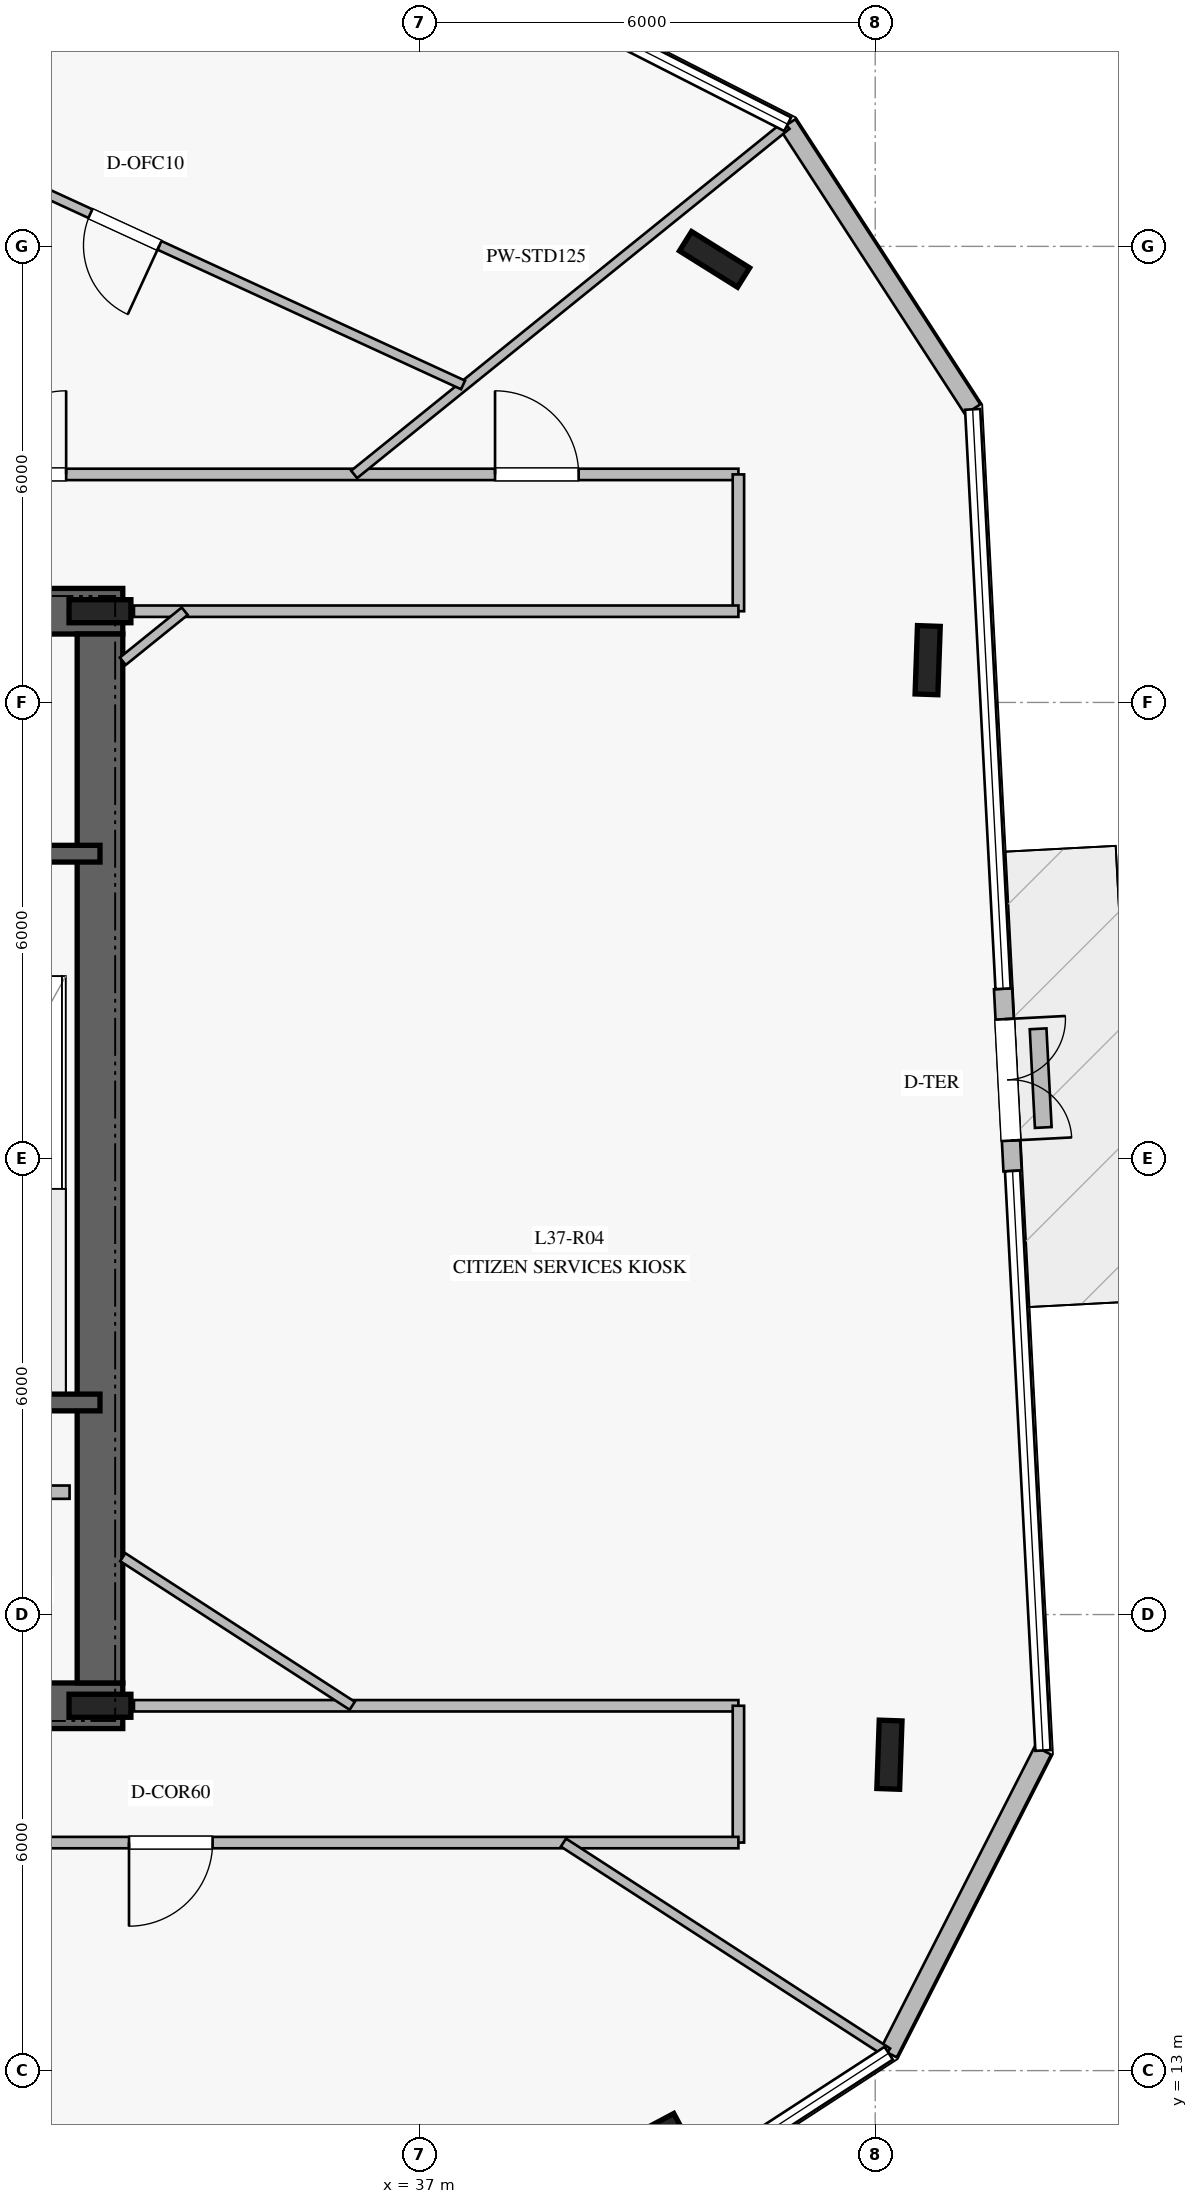
"""IFC4 building model, lengths in metres.
Left out: names, types, materials, properties, quantities, classifications, styles, units other than length and angle.
Written with IfcOpenShell. Run it as: python <this file> out.ifc"""

import sys

from ifc_helpers import new_model, si_unit, direction, frame, frame_2d, origin, origin_2d, place, context, subcontext, project, spatial, rectangle, i_section, extrude, element, fill, save


model = new_model("IFC4")
c1 = context("Model", 3, precision=1e-05, world=origin(), true_north=direction((0.0, 1.0)))
c2 = subcontext(c1, "Body", "Model", "MODEL_VIEW")
j1 = project(units=[si_unit("LENGTHUNIT", "METRE"), si_unit("PLANEANGLEUNIT", "RADIAN")], contexts=[c1])
p1 = place(None, origin())
s1 = spatial("IfcSite", under=j1, at=p1, CompositionType="ELEMENT")
p2 = place(p1, origin())
s2 = spatial("IfcBuilding", under=s1, at=p2, CompositionType="ELEMENT")
p3 = place(p2, frame((0.0, 0.0, 154.4)))
s3 = spatial("IfcBuildingStorey", under=s2, at=p3, CompositionType="ELEMENT", Elevation=154.4)
p4 = place(p3, frame((16.9, 17.8, 0.0), z_axis=(0.0, 0.0, 1.0), x_axis=(1.0, 0.0, 0.0)))
e1 = element("IfcWall", 1, at=p4, inside=s3, PredefinedType="SHEAR", context=c2, shape_type="SweptSolid", body=[
    extrude(rectangle(XDim=16.2, YDim=0.6, at=frame_2d((8.1, 0.0))), origin(), (0.0, 0.0, 1.0), 3.76),
])
p5 = place(p4, frame((5.05, 0.0, 0.0)))
e2 = element("IfcOpeningElement", 2, at=p5, cuts=e1, PredefinedType="OPENING", context=c2, shape_type="SweptSolid", body=[
    extrude(rectangle(XDim=1.2, YDim=2.25, at=frame_2d((0.6, 1.125))), frame((0.0, 0.31, 0.0), z_axis=(0.0, -1.0, 0.0), x_axis=(1.0, 0.0, 0.0)), (0.0, 0.0, 1.0), 0.62),
])
p6 = place(p4, frame((10.95, 0.0, 0.0)))
e3 = element("IfcOpeningElement", 3, at=p6, cuts=e1, PredefinedType="OPENING", context=c2, shape_type="SweptSolid", body=[
    extrude(rectangle(XDim=1.1, YDim=2.2, at=frame_2d((0.55, 1.1))), frame((0.0, 0.31, 0.0), z_axis=(0.0, -1.0, 0.0), x_axis=(1.0, 0.0, 0.0)), (0.0, 0.0, 1.0), 0.62),
])
p7 = place(p3, frame((33.1, 32.2, 0.0), z_axis=(0.0, 0.0, 1.0), x_axis=(-1.0, 0.0, 0.0)))
e4 = element("IfcWall", 4, at=p7, inside=s3, PredefinedType="SHEAR", context=c2, shape_type="SweptSolid", body=[
    extrude(rectangle(XDim=16.2, YDim=0.6, at=frame_2d((8.1, 0.0))), origin(), (0.0, 0.0, 1.0), 3.76),
])
p8 = place(p7, frame((5.05, 0.0, 0.0)))
e5 = element("IfcOpeningElement", 5, at=p8, cuts=e4, PredefinedType="OPENING", context=c2, shape_type="SweptSolid", body=[
    extrude(rectangle(XDim=1.2, YDim=2.25, at=frame_2d((0.6, 1.125))), frame((0.0, 0.31, 0.0), z_axis=(0.0, -1.0, 0.0), x_axis=(1.0, 0.0, 0.0)), (0.0, 0.0, 1.0), 0.62),
])
p9 = place(p7, frame((11.85, 0.0, 0.0)))
e6 = element("IfcOpeningElement", 6, at=p9, cuts=e4, PredefinedType="OPENING", context=c2, shape_type="SweptSolid", body=[
    extrude(rectangle(XDim=1.1, YDim=2.2, at=frame_2d((0.55, 1.1))), frame((0.0, 0.31, 0.0), z_axis=(0.0, -1.0, 0.0), x_axis=(1.0, 0.0, 0.0)), (0.0, 0.0, 1.0), 0.62),
])
p10 = place(p7, frame((9.875, 0.0, 0.0)))
e7 = element("IfcOpeningElement", 7, at=p10, cuts=e4, PredefinedType="OPENING", context=c2, shape_type="SweptSolid", body=[
    extrude(rectangle(XDim=1.1, YDim=2.2, at=frame_2d((0.55, 1.1))), frame((0.0, 0.31, 0.0), z_axis=(0.0, -1.0, 0.0), x_axis=(1.0, 0.0, 0.0)), (0.0, 0.0, 1.0), 0.62),
])
p11 = place(p7, frame((7.9, 0.0, 0.0)))
e8 = element("IfcOpeningElement", 8, at=p11, cuts=e4, PredefinedType="OPENING", context=c2, shape_type="SweptSolid", body=[
    extrude(rectangle(XDim=1.1, YDim=2.2, at=frame_2d((0.55, 1.1))), frame((0.0, 0.31, 0.0), z_axis=(0.0, -1.0, 0.0), x_axis=(1.0, 0.0, 0.0)), (0.0, 0.0, 1.0), 0.62),
])
p12 = place(p3, frame((32.8, 18.1, 0.0), z_axis=(0.0, 0.0, 1.0), x_axis=(0.0, 1.0, 0.0)))
e9 = element("IfcWall", 9, at=p12, inside=s3, PredefinedType="SHEAR", context=c2, shape_type="SweptSolid", body=[
    extrude(rectangle(XDim=13.8, YDim=0.6, at=frame_2d((6.9, 0.0))), origin(), (0.0, 0.0, 1.0), 3.76),
])
for number, where, z_axis, x_axis in (
    (10, (32.8, 17.8, 0.0), (0.0, 0.0, 1.0), (1.0, 0.0, 0.0)),
    (11, (32.8, 32.2, 0.0), (0.0, 0.0, 1.0), (1.0, 0.0, 0.0)),
):
    element("IfcColumn", number, at=place(p3, frame(where, z_axis=z_axis, x_axis=x_axis)), inside=s3, PredefinedType="COLUMN", context=c2, shape_type="SweptSolid", body=[
        extrude(i_section(OverallWidth=0.303, OverallDepth=0.814, WebThickness=0.021, FlangeThickness=0.04, at=origin_2d()), origin(), (0.0, 0.0, 1.0), 4.0),
    ])
for number, where, z_axis, x_axis in (
    (12, (29.08, 21.79, 0.0), (0.0, 0.0, 1.0), (1.0, 0.0, 0.0)),
    (13, (29.08, 29.01, 0.0), (0.0, 0.0, 1.0), (1.0, 0.0, 0.0)),
):
    element("IfcWall", number, at=place(p3, frame(where, z_axis=z_axis, x_axis=x_axis)), inside=s3, PredefinedType="SOLIDWALL", context=c2, shape_type="SweptSolid", body=[
        extrude(rectangle(XDim=3.72, YDim=0.22, at=frame_2d((1.86, 0.0))), origin(), (0.0, 0.0, 1.0), 3.76),
    ])
for number, where, z_axis, x_axis in (
    (14, (40.886, 36.829, 0.0), (0.0, 0.0, 1.0), (-0.848, 0.53, 0.0)),
    (15, (40.023, 12.092, 0.0), (0.0, 0.0, 1.0), (0.883, 0.469, 0.0)),
    (16, (43.187, 17.156, 0.0), (0.0, 0.0, 1.0), (0.035, 0.999, 0.0)),
    (17, (43.69, 31.556, 0.0), (0.0, 0.0, 1.0), (0.035, 0.999, 0.0)),
):
    element("IfcColumn", number, at=place(p3, frame(where, z_axis=z_axis, x_axis=x_axis)), inside=s3, PredefinedType="COLUMN", context=c2, shape_type="SweptSolid", body=[
        extrude(i_section(OverallWidth=0.3, OverallDepth=0.9, WebThickness=0.019, FlangeThickness=0.035, at=origin_2d()), origin(), (0.0, 0.0, 1.0), 4.0),
    ])
p13 = place(p3, frame((43.177, 13.229, 0.0), z_axis=(0.0, 0.0, 1.0), x_axis=(0.454103301767, 0.89094903969, 0.0)))
e18 = element("IfcWall", 18, at=p13, inside=s3, PredefinedType="STANDARD", context=c2, shape_type="SweptSolid", body=[
    extrude(rectangle(XDim=4.47, YDim=0.24, at=frame_2d((2.235, 0.0))), origin(), (0.0, 0.0, 1.0), 3.76),
])
p14 = place(p3, frame((44.807, 24.836, 0.0), z_axis=(0.0, 0.0, 1.0), x_axis=(-0.052078347636, 0.998643002132, 0.0)))
e19 = element("IfcWall", 19, at=p14, inside=s3, PredefinedType="STANDARD", context=c2, shape_type="SweptSolid", body=[
    extrude(rectangle(XDim=2.4, YDim=0.24, at=frame_2d((1.2, 0.0))), origin(), (0.0, 0.0, 1.0), 3.76),
])
p15 = place(p14, frame((0.4, 0.0, 0.0)))
e20 = element("IfcOpeningElement", 20, at=p15, cuts=e19, PredefinedType="OPENING", context=c2, shape_type="SweptSolid", body=[
    extrude(rectangle(XDim=1.6, YDim=2.25, at=frame_2d((0.8, 1.125))), frame((0.0, 0.13, 0.0), z_axis=(0.0, -1.0, 0.0), x_axis=(1.0, 0.0, 0.0)), (0.0, 0.0, 1.0), 0.26),
])
p16 = place(p3, frame((44.282, 34.856, 0.0), z_axis=(0.0, 0.0, 1.0), x_axis=(-0.544351046129, 0.838857519832, 0.0)))
e21 = element("IfcWall", 21, at=p16, inside=s3, PredefinedType="STANDARD", context=c2, shape_type="SweptSolid", body=[
    extrude(rectangle(XDim=4.471, YDim=0.24, at=frame_2d((2.236, 0.0))), origin(), (0.0, 0.0, 1.0), 3.76),
])
p17 = place(p3, frame((45.211, 25.408, 0.0), z_axis=(0.0, 0.0, 1.0), x_axis=(-0.052213802573, 0.998635929066, 0.0)))
e22 = element("IfcWall", 22, at=p17, inside=s3, PredefinedType="USERDEFINED", context=c2, shape_type="SweptSolid", body=[
    extrude(rectangle(XDim=1.3, YDim=0.22, at=frame_2d((0.65, 0.0))), origin(), (0.0, 0.0, 1.0), 0.4),
])
p18 = place(p3, frame((30.3, 20.61, 0.0), z_axis=(0.0, 0.0, 1.0), x_axis=(1.0, 0.0, 0.0)))
e23 = element("IfcWall", 23, at=p18, inside=s3, PredefinedType="PARTITIONING", context=c2, shape_type="SweptSolid", body=[
    extrude(rectangle(XDim=2.1, YDim=0.175, at=frame_2d((1.05, 0.0))), origin(), (0.0, 0.0, 1.0), 3.76),
])
p19 = place(p3, frame((25.95, 34.0, 0.0), z_axis=(0.0, 0.0, 1.0), x_axis=(1.0, 0.0, 0.0)))
e24 = element("IfcWall", 24, at=p19, inside=s3, PredefinedType="PARTITIONING", context=c2, shape_type="SweptSolid", body=[
    extrude(rectangle(XDim=15.25, YDim=0.15, at=frame_2d((7.625, 0.0))), origin(), (0.0, 0.0, 1.0), 3.21),
])
p20 = place(p19, frame((12.048, 0.0, 0.0)))
e25 = element("IfcOpeningElement", 25, at=p20, cuts=e24, PredefinedType="OPENING", context=c2, shape_type="SweptSolid", body=[
    extrude(rectangle(XDim=1.1, YDim=2.2, at=frame_2d((0.55, 1.1))), frame((0.0, 0.085, 0.0), z_axis=(0.0, -1.0, 0.0), x_axis=(1.0, 0.0, 0.0)), (0.0, 0.0, 1.0), 0.17),
])
p21 = place(p19, frame((5.305, 0.0, 0.0)))
e26 = element("IfcOpeningElement", 26, at=p21, cuts=e24, PredefinedType="OPENING", context=c2, shape_type="SweptSolid", body=[
    extrude(rectangle(XDim=1.1, YDim=2.2, at=frame_2d((0.55, 1.1))), frame((0.0, 0.085, 0.0), z_axis=(0.0, -1.0, 0.0), x_axis=(1.0, 0.0, 0.0)), (0.0, 0.0, 1.0), 0.17),
])
p22 = place(p3, frame((41.2, 34.0, 0.0), z_axis=(0.0, 0.0, 1.0), x_axis=(0.0, -1.0, 0.0)))
e27 = element("IfcWall", 27, at=p22, inside=s3, PredefinedType="PARTITIONING", context=c2, shape_type="SweptSolid", body=[
    extrude(rectangle(XDim=1.8, YDim=0.15, at=frame_2d((0.9, 0.0))), origin(), (0.0, 0.0, 1.0), 3.76),
])
for number, where, z_axis, x_axis in (
    (28, (41.2, 32.2, 0.0), (0.0, 0.0, 1.0), (-1.0, 0.0, 0.0)),
    (29, (33.247, 17.8, 0.0), (0.0, 0.0, 1.0), (1.0, 0.0, 0.0)),
):
    element("IfcWall", number, at=place(p3, frame(where, z_axis=z_axis, x_axis=x_axis)), inside=s3, PredefinedType="PARTITIONING", context=c2, shape_type="SweptSolid", body=[
        extrude(rectangle(XDim=7.953, YDim=0.15, at=frame_2d((3.977, 0.0))), origin(), (0.0, 0.0, 1.0), 3.21),
    ])
p23 = place(p3, frame((41.2, 17.8, 0.0), z_axis=(0.0, 0.0, 1.0), x_axis=(0.0, -1.0, 0.0)))
e30 = element("IfcWall", 30, at=p23, inside=s3, PredefinedType="PARTITIONING", context=c2, shape_type="SweptSolid", body=[
    extrude(rectangle(XDim=1.8, YDim=0.15, at=frame_2d((0.9, 0.0))), origin(), (0.0, 0.0, 1.0), 3.21),
])
p24 = place(p3, frame((41.2, 16.0, 0.0), z_axis=(0.0, 0.0, 1.0), x_axis=(-1.0, 0.0, 0.0)))
e31 = element("IfcWall", 31, at=p24, inside=s3, PredefinedType="PARTITIONING", context=c2, shape_type="SweptSolid", body=[
    extrude(rectangle(XDim=15.25, YDim=0.15, at=frame_2d((7.625, 0.0))), origin(), (0.0, 0.0, 1.0), 3.21),
])
p25 = place(p24, frame((13.306, 0.0, 0.0)))
e32 = element("IfcOpeningElement", 32, at=p25, cuts=e31, PredefinedType="OPENING", context=c2, shape_type="SweptSolid", body=[
    extrude(rectangle(XDim=1.1, YDim=2.2, at=frame_2d((0.55, 1.1))), frame((0.0, 0.085, 0.0), z_axis=(0.0, -1.0, 0.0), x_axis=(1.0, 0.0, 0.0)), (0.0, 0.0, 1.0), 0.17),
])
p26 = place(p24, frame((6.918, 0.0, 0.0)))
e33 = element("IfcOpeningElement", 33, at=p26, cuts=e31, PredefinedType="OPENING", context=c2, shape_type="SweptSolid", body=[
    extrude(rectangle(XDim=1.1, YDim=2.2, at=frame_2d((0.55, 1.1))), frame((0.0, 0.085, 0.0), z_axis=(0.0, -1.0, 0.0), x_axis=(1.0, 0.0, 0.0)), (0.0, 0.0, 1.0), 0.17),
])
p27 = place(p3, frame((33.1, 31.542, 0.0), z_axis=(0.0, 0.0, 1.0), x_axis=(0.778063867774, 0.628185177846, 0.0)))
e34 = element("IfcWall", 34, at=p27, inside=s3, PredefinedType="PARTITIONING", context=c2, shape_type="SweptSolid", body=[
    extrude(rectangle(XDim=1.047, YDim=0.125, at=frame_2d((0.524, 0.0))), origin(), (0.0, 0.0, 1.0), 3.21),
])
p28 = place(p3, frame((36.144, 34.0, 0.0), z_axis=(0.0, 0.0, 1.0), x_axis=(0.777938669593, 0.62834021545, 0.0)))
e35 = element("IfcWall", 35, at=p28, inside=s3, PredefinedType="PARTITIONING", context=c2, shape_type="SweptSolid", body=[
    extrude(rectangle(XDim=7.313, YDim=0.125, at=frame_2d((3.656, 0.0))), origin(), (0.0, 0.0, 1.0), 3.16),
])
p29 = place(p3, frame((33.1, 19.755, 0.0), z_axis=(0.0, 0.0, 1.0), x_axis=(0.839380694324, -0.543543972459, 0.0)))
e36 = element("IfcWall", 36, at=p29, inside=s3, PredefinedType="PARTITIONING", context=c2, shape_type="SweptSolid", body=[
    extrude(rectangle(XDim=3.596, YDim=0.125, at=frame_2d((1.798, 0.0))), origin(), (0.0, 0.0, 1.0), 3.21),
])
p30 = place(p3, frame((38.898, 16.0, 0.0), z_axis=(0.0, 0.0, 1.0), x_axis=(0.839406365223, -0.543504327511, 0.0)))
e37 = element("IfcWall", 37, at=p30, inside=s3, PredefinedType="PARTITIONING", context=c2, shape_type="SweptSolid", body=[
    extrude(rectangle(XDim=5.08, YDim=0.125, at=frame_2d((2.54, 0.0))), origin(), (0.0, 0.0, 1.0), 3.16),
])
p31 = place(p3, frame((37.577, 35.177, 0.0), z_axis=(0.0, 0.0, 1.0), x_axis=(-0.908588116284, 0.417693230671, 0.0)))
e38 = element("IfcWall", 38, at=p31, inside=s3, PredefinedType="PARTITIONING", context=c2, shape_type="SweptSolid", body=[
    extrude(rectangle(XDim=9.792, YDim=0.125, at=frame_2d((4.896, 0.0))), origin(), (0.0, 0.0, 1.0), 3.21),
])
p32 = place(p31, frame((4.396, 0.0, 0.0)))
e39 = element("IfcOpeningElement", 39, at=p32, cuts=e38, PredefinedType="OPENING", context=c2, shape_type="SweptSolid", body=[
    extrude(rectangle(XDim=1.0, YDim=2.15, at=frame_2d((0.5, 1.075))), frame((0.0, 0.073, 0.0), z_axis=(0.0, -1.0, 0.0), x_axis=(1.0, 0.0, 0.0)), (0.0, 0.0, 1.0), 0.145),
])
p33 = place(p15, frame((1.6, 0.0, 0.0), z_axis=(0.0, 0.0, 1.0), x_axis=(-1.0, 0.0, 0.0)))
e40 = element("IfcDoor", 40, at=p33, inside=s3, OperationType="DOUBLE_DOOR_SINGLE_SWING", PredefinedType="DOOR", context=c2, shape_type="SweptSolid", body=[
    extrude(rectangle(XDim=1.6, YDim=2.25, at=frame_2d((0.8, 1.125))), frame((0.0, 0.025, 0.0), z_axis=(0.0, -1.0, 0.0), x_axis=(1.0, 0.0, 0.0)), (0.0, 0.0, 1.0), 0.05),
])
fill(e20, e40)
p34 = place(p26, origin())
e41 = element("IfcDoor", 41, at=p34, inside=s3, OperationType="SINGLE_SWING_RIGHT", PredefinedType="DOOR", context=c2, shape_type="SweptSolid", body=[
    extrude(rectangle(XDim=1.1, YDim=2.2, at=frame_2d((0.55, 1.1))), frame((0.0, 0.025, 0.0), z_axis=(0.0, -1.0, 0.0), x_axis=(1.0, 0.0, 0.0)), (0.0, 0.0, 1.0), 0.05),
])
fill(e33, e41)
p35 = place(p20, origin())
e42 = element("IfcDoor", 42, at=p35, inside=s3, OperationType="SINGLE_SWING_LEFT", PredefinedType="DOOR", context=c2, shape_type="SweptSolid", body=[
    extrude(rectangle(XDim=1.1, YDim=2.2, at=frame_2d((0.55, 1.1))), frame((0.0, 0.025, 0.0), z_axis=(0.0, -1.0, 0.0), x_axis=(1.0, 0.0, 0.0)), (0.0, 0.0, 1.0), 0.05),
])
fill(e25, e42)
p36 = place(p21, origin())
e43 = element("IfcDoor", 43, at=p36, inside=s3, OperationType="SINGLE_SWING_RIGHT", PredefinedType="DOOR", context=c2, shape_type="SweptSolid", body=[
    extrude(rectangle(XDim=1.1, YDim=2.2, at=frame_2d((0.55, 1.1))), frame((0.0, 0.025, 0.0), z_axis=(0.0, -1.0, 0.0), x_axis=(1.0, 0.0, 0.0)), (0.0, 0.0, 1.0), 0.05),
])
fill(e26, e43)
p37 = place(p32, origin())
e44 = element("IfcDoor", 44, at=p37, inside=s3, OperationType="SINGLE_SWING_LEFT", PredefinedType="DOOR", context=c2, shape_type="SweptSolid", body=[
    extrude(rectangle(XDim=1.0, YDim=2.15, at=frame_2d((0.5, 1.075))), frame((0.0, 0.025, 0.0), z_axis=(0.0, -1.0, 0.0), x_axis=(1.0, 0.0, 0.0)), (0.0, 0.0, 1.0), 0.05),
])
fill(e39, e44)
save(model, sys.argv[1])
